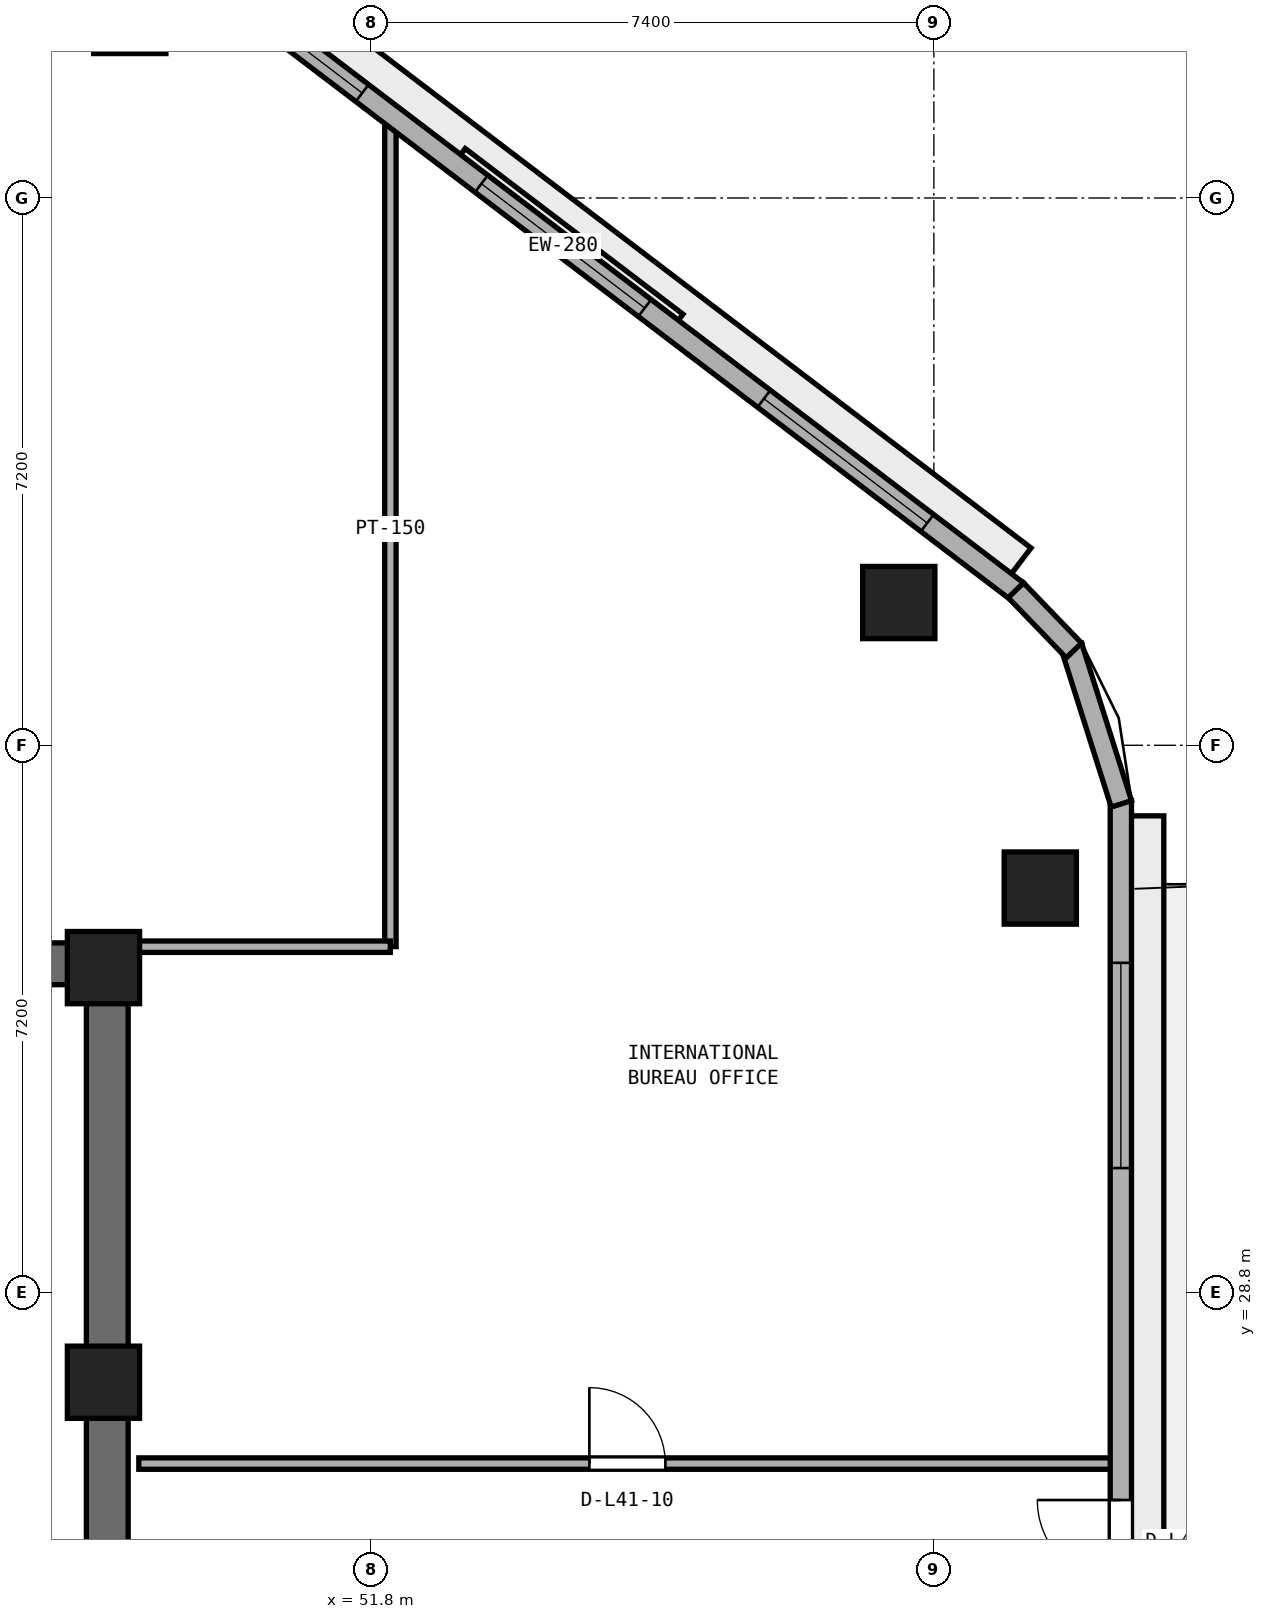
"""IFC4 building model, lengths in metres.
Left out: names, types, materials, properties, quantities, classifications, styles, units other than length and angle.
Written with IfcOpenShell. Run it as: python <this file> out.ifc"""

import sys

from ifc_helpers import new_model, si_unit, direction, frame, frame_2d, origin, origin_2d, place, context, subcontext, project, spatial, rectangle, extrude, element, fill, save


model = new_model("IFC4")
c1 = context("Model", 3, precision=1e-05, world=origin(), true_north=direction((0.0, 1.0)))
c2 = subcontext(c1, "Body", "Model", "MODEL_VIEW")
j1 = project(units=[si_unit("LENGTHUNIT", "METRE"), si_unit("PLANEANGLEUNIT", "RADIAN")], contexts=[c1])
p1 = place(None, origin())
s1 = spatial("IfcSite", under=j1, at=p1, CompositionType="ELEMENT")
p2 = place(p1, origin())
s2 = spatial("IfcBuilding", under=s1, at=p2, CompositionType="ELEMENT")
p3 = place(p2, frame((0.0, 0.0, 163.0)))
s3 = spatial("IfcBuildingStorey", under=s2, at=p3, CompositionType="ELEMENT", Elevation=163.0)
p4 = place(p3, frame((25.4, 33.125, 0.0), z_axis=(0.0, 0.0, 1.0), x_axis=(1.0, 0.0, 0.0)))
e1 = element("IfcWall", 1, at=p4, inside=s3, PredefinedType="SHEAR", context=c2, shape_type="SweptSolid", body=[
    extrude(rectangle(XDim=23.2, YDim=0.55, at=frame_2d((11.6, 0.0))), origin(), (0.0, 0.0, 1.0), 3.54),
])
p5 = place(p3, frame((48.325, 17.55, 0.0), z_axis=(0.0, 0.0, 1.0), x_axis=(0.0, 1.0, 0.0)))
e2 = element("IfcWall", 2, at=p5, inside=s3, PredefinedType="SHEAR", context=c2, shape_type="SweptSolid", body=[
    extrude(rectangle(XDim=15.3, YDim=0.55, at=frame_2d((7.65, 0.0))), origin(), (0.0, 0.0, 1.0), 3.54),
])
p6 = place(p5, frame((5.75, 0.0, 0.0)))
e3 = element("IfcOpeningElement", 3, at=p6, cuts=e2, PredefinedType="OPENING", context=c2, shape_type="SweptSolid", body=[
    extrude(rectangle(XDim=1.5, YDim=2.15, at=frame_2d((0.75, 1.075))), frame((0.0, 0.285, 0.0), z_axis=(0.0, -1.0, 0.0), x_axis=(1.0, 0.0, 0.0)), (0.0, 0.0, 1.0), 0.57),
])
for number, where, z_axis, x_axis in (
    (4, (48.275, 27.62, 0.0), (0.0, 0.0, 1.0), (1.0, 0.0, 0.0)),
    (5, (48.275, 33.075, 0.0), (0.0, 0.0, 1.0), (1.0, 0.0, 0.0)),
):
    element("IfcColumn", number, at=place(p3, frame(where, z_axis=z_axis, x_axis=x_axis)), inside=s3, PredefinedType="PILASTER", context=c2, shape_type="SweptSolid", body=[
        extrude(rectangle(XDim=0.95, YDim=0.95, at=origin_2d()), origin(), (0.0, 0.0, 1.0), 3.8),
    ])
for number, where, z_axis, x_axis in (
    (6, (60.6, 34.122, 0.0), (0.0, 0.0, 1.0), (1.0, 0.0, 0.0)),
    (7, (58.738, 37.878, 0.0), (0.0, 0.0, 1.0), (1.0, 0.0, 0.0)),
    (8, (48.622, 45.575, 0.0), (0.0, 0.0, 1.0), (1.0, 0.0, 0.0)),
):
    element("IfcColumn", number, at=place(p3, frame(where, z_axis=z_axis, x_axis=x_axis)), inside=s3, PredefinedType="COLUMN", context=c2, shape_type="SweptSolid", body=[
        extrude(rectangle(XDim=0.95, YDim=0.95, at=origin_2d()), origin(), (0.0, 0.0, 1.0), 3.8),
    ])
p7 = place(p3, frame((52.05, 33.352, 0.0), z_axis=(0.0, 0.0, 1.0), x_axis=(0.0, 1.0, 0.0)))
e9 = element("IfcWall", 9, at=p7, inside=s3, PredefinedType="PARTITIONING", context=c2, shape_type="SweptSolid", body=[
    extrude(rectangle(XDim=10.983, YDim=0.15, at=frame_2d((5.491, 0.0))), origin(), (0.0, 0.0, 1.0), 3.54),
])
p8 = place(p3, frame((48.74, 26.55, 0.0), z_axis=(0.0, 0.0, 1.0), x_axis=(1.0, 0.0, 0.0)))
e10 = element("IfcWall", 10, at=p8, inside=s3, PredefinedType="PARTITIONING", context=c2, shape_type="SweptSolid", body=[
    extrude(rectangle(XDim=12.855, YDim=0.15, at=frame_2d((6.427, 0.0))), origin(), (0.0, 0.0, 1.0), 3.54),
])
p9 = place(p8, frame((5.927, 0.0, 0.0)))
e11 = element("IfcOpeningElement", 11, at=p9, cuts=e10, PredefinedType="OPENING", context=c2, shape_type="SweptSolid", body=[
    extrude(rectangle(XDim=1.0, YDim=2.12, at=frame_2d((0.5, 1.06))), frame((0.0, 0.085, 0.0), z_axis=(0.0, -1.0, 0.0), x_axis=(1.0, 0.0, 0.0)), (0.0, 0.0, 1.0), 0.17),
])
p10 = place(p3, frame((48.74, 33.35, 0.0), z_axis=(0.0, 0.0, 1.0), x_axis=(1.0, 0.0, 0.0)))
e12 = element("IfcWall", 12, at=p10, inside=s3, PredefinedType="PARTITIONING", context=c2, shape_type="SweptSolid", body=[
    extrude(rectangle(XDim=3.309, YDim=0.15, at=frame_2d((1.654, 0.0))), origin(), (0.0, 0.0, 1.0), 2.923),
])
p11 = place(p3, frame((61.66, 16.369, 0.0), z_axis=(0.0, 0.0, 1.0), x_axis=(0.0, 1.0, 0.0)))
e13 = element("IfcWall", 13, at=p11, inside=s3, PredefinedType="STANDARD", context=c2, shape_type="SweptSolid", body=[
    extrude(rectangle(XDim=18.902, YDim=0.28, at=frame_2d((9.451, 0.0))), origin(), (0.0, 0.0, 1.0), 3.54),
])
p12 = place(p11, frame((8.601, 0.0, 0.0)))
e14 = element("IfcOpeningElement", 14, at=p12, cuts=e13, PredefinedType="OPENING", context=c2, shape_type="SweptSolid", body=[
    extrude(rectangle(XDim=1.1, YDim=2.2, at=frame_2d((0.55, 1.1))), frame((0.0, 0.15, 0.0), z_axis=(0.0, -1.0, 0.0), x_axis=(1.0, 0.0, 0.0)), (0.0, 0.0, 1.0), 0.3),
])
p13 = place(p11, frame((2.134, 0.0, 0.9)))
e15 = element("IfcOpeningElement", 15, at=p13, cuts=e13, PredefinedType="OPENING", context=c2, shape_type="SweptSolid", body=[
    extrude(rectangle(XDim=2.7, YDim=1.75, at=frame_2d((1.35, 0.875))), frame((0.0, 0.15, 0.0), z_axis=(0.0, -1.0, 0.0), x_axis=(1.0, 0.0, 0.0)), (0.0, 0.0, 1.0), 0.3),
])
p14 = place(p11, frame((14.069, 0.0, 0.9)))
e16 = element("IfcOpeningElement", 16, at=p14, cuts=e13, PredefinedType="OPENING", context=c2, shape_type="SweptSolid", body=[
    extrude(rectangle(XDim=2.7, YDim=1.75, at=frame_2d((1.35, 0.875))), frame((0.0, 0.15, 0.0), z_axis=(0.0, -1.0, 0.0), x_axis=(1.0, 0.0, 0.0)), (0.0, 0.0, 1.0), 0.3),
])
p15 = place(p3, frame((60.295, 38.025, 0.0), z_axis=(0.0, 0.0, 1.0), x_axis=(-0.795831760834, 0.605517801925, 0.0)))
e17 = element("IfcWall", 17, at=p15, inside=s3, PredefinedType="STANDARD", context=c2, shape_type="SweptSolid", body=[
    extrude(rectangle(XDim=15.012, YDim=0.28, at=frame_2d((7.506, 0.0))), origin(), (0.0, 0.0, 1.0), 3.54),
])
p16 = place(p15, frame((1.485, 0.0, 0.9)))
e18 = element("IfcOpeningElement", 18, at=p16, cuts=e17, PredefinedType="OPENING", context=c2, shape_type="SweptSolid", body=[
    extrude(rectangle(XDim=2.7, YDim=1.75, at=frame_2d((1.35, 0.875))), frame((0.0, 0.15, 0.0), z_axis=(0.0, -1.0, 0.0), x_axis=(1.0, 0.0, 0.0)), (0.0, 0.0, 1.0), 0.3),
])
p17 = place(p15, frame((6.156, 0.0, 0.9)))
e19 = element("IfcOpeningElement", 19, at=p17, cuts=e17, PredefinedType="OPENING", context=c2, shape_type="SweptSolid", body=[
    extrude(rectangle(XDim=2.7, YDim=1.75, at=frame_2d((1.35, 0.875))), frame((0.0, 0.15, 0.0), z_axis=(0.0, -1.0, 0.0), x_axis=(1.0, 0.0, 0.0)), (0.0, 0.0, 1.0), 0.3),
])
p18 = place(p15, frame((10.826, 0.0, 0.9)))
e20 = element("IfcOpeningElement", 20, at=p18, cuts=e17, PredefinedType="OPENING", context=c2, shape_type="SweptSolid", body=[
    extrude(rectangle(XDim=2.7, YDim=1.75, at=frame_2d((1.35, 0.875))), frame((0.0, 0.15, 0.0), z_axis=(0.0, -1.0, 0.0), x_axis=(1.0, 0.0, 0.0)), (0.0, 0.0, 1.0), 0.3),
])
p19 = place(p3, frame((61.667, 35.229, 0.0), z_axis=(0.0, 0.0, 1.0), x_axis=(-0.302044777107, 0.953293738898, 0.0)))
e21 = element("IfcWall", 21, at=p19, inside=s3, PredefinedType="STANDARD", context=c2, shape_type="SweptSolid", body=[
    extrude(rectangle(XDim=2.174, YDim=0.28, at=frame_2d((1.087, 0.0))), origin(), (0.0, 0.0, 1.0), 3.54),
])
p20 = place(p3, frame((61.042, 37.247, 0.0), z_axis=(0.0, 0.0, 1.0), x_axis=(-0.694004126367, 0.719971022045, 0.0)))
e22 = element("IfcWall", 22, at=p20, inside=s3, PredefinedType="STANDARD", context=c2, shape_type="SweptSolid", body=[
    extrude(rectangle(XDim=1.1, YDim=0.28, at=frame_2d((0.55, 0.0))), origin(), (0.0, 0.0, 1.0), 3.54),
])
p21 = place(p9, origin())
e23 = element("IfcDoor", 23, at=p21, inside=s3, OperationType="SINGLE_SWING_LEFT", PredefinedType="DOOR", context=c2, shape_type="SweptSolid", body=[
    extrude(rectangle(XDim=1.0, YDim=2.12, at=frame_2d((0.5, 1.06))), frame((0.0, 0.025, 0.0), z_axis=(0.0, -1.0, 0.0), x_axis=(1.0, 0.0, 0.0)), (0.0, 0.0, 1.0), 0.05),
])
fill(e11, e23)
p22 = place(p12, origin())
e24 = element("IfcDoor", 24, at=p22, inside=s3, OperationType="SINGLE_SWING_RIGHT", PredefinedType="DOOR", context=c2, shape_type="SweptSolid", body=[
    extrude(rectangle(XDim=1.1, YDim=2.2, at=frame_2d((0.55, 1.1))), frame((0.0, 0.025, 0.0), z_axis=(0.0, -1.0, 0.0), x_axis=(1.0, 0.0, 0.0)), (0.0, 0.0, 1.0), 0.05),
])
fill(e14, e24)
p23 = place(p14, origin())
e25 = element("IfcWindow", 25, at=p23, inside=s3, PartitioningType="SINGLE_PANEL", PredefinedType="WINDOW", context=c2, shape_type="SweptSolid", body=[
    extrude(rectangle(XDim=2.7, YDim=1.75, at=frame_2d((1.35, 0.875))), frame((0.0, 0.03, 0.0), z_axis=(0.0, -1.0, 0.0), x_axis=(1.0, 0.0, 0.0)), (0.0, 0.0, 1.0), 0.06),
])
fill(e16, e25)
p24 = place(p16, origin())
e26 = element("IfcWindow", 26, at=p24, inside=s3, PartitioningType="SINGLE_PANEL", PredefinedType="WINDOW", context=c2, shape_type="SweptSolid", body=[
    extrude(rectangle(XDim=2.7, YDim=1.75, at=frame_2d((1.35, 0.875))), frame((0.0, 0.03, 0.0), z_axis=(0.0, -1.0, 0.0), x_axis=(1.0, 0.0, 0.0)), (0.0, 0.0, 1.0), 0.06),
])
fill(e18, e26)
p25 = place(p17, origin())
e27 = element("IfcWindow", 27, at=p25, inside=s3, PartitioningType="SINGLE_PANEL", PredefinedType="WINDOW", context=c2, shape_type="SweptSolid", body=[
    extrude(rectangle(XDim=2.7, YDim=1.75, at=frame_2d((1.35, 0.875))), frame((0.0, 0.03, 0.0), z_axis=(0.0, -1.0, 0.0), x_axis=(1.0, 0.0, 0.0)), (0.0, 0.0, 1.0), 0.06),
])
fill(e19, e27)
p26 = place(p18, origin())
e28 = element("IfcWindow", 28, at=p26, inside=s3, PartitioningType="SINGLE_PANEL", PredefinedType="WINDOW", context=c2, shape_type="SweptSolid", body=[
    extrude(rectangle(XDim=2.7, YDim=1.75, at=frame_2d((1.35, 0.875))), frame((0.0, 0.03, 0.0), z_axis=(0.0, -1.0, 0.0), x_axis=(1.0, 0.0, 0.0)), (0.0, 0.0, 1.0), 0.06),
])
fill(e20, e28)
save(model, sys.argv[1])
